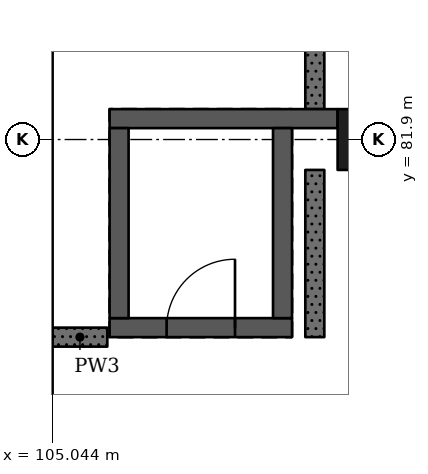
"""IFC4 building model, lengths in metres.
Left out: names, types, materials, properties, quantities, classifications, styles, units other than length and angle.
Written with IfcOpenShell. Run it as: python <this file> out.ifc"""

import sys

from ifc_helpers import new_model, si_unit, direction, frame, frame_2d, origin, origin_2d, place, context, subcontext, project, spatial, rectangle, extrude, element, fill, save


model = new_model("IFC4")
c1 = context("Model", 3, precision=1e-05, world=origin(), true_north=direction((0.0, 1.0)))
c2 = subcontext(c1, "Body", "Model", "MODEL_VIEW")
j1 = project(units=[si_unit("LENGTHUNIT", "METRE"), si_unit("PLANEANGLEUNIT", "RADIAN")], contexts=[c1])
p1 = place(None, origin())
s1 = spatial("IfcSite", under=j1, at=p1, CompositionType="ELEMENT")
p2 = place(p1, origin())
s2 = spatial("IfcBuilding", under=s1, at=p2, CompositionType="ELEMENT")
p3 = place(p2, frame((0.0, 0.0, 6.37)))
s3 = spatial("IfcBuildingStorey", under=s2, at=p3, CompositionType="ELEMENT", Elevation=6.37)
p4 = place(p3, frame((109.2, 81.9, 0.0), z_axis=(0.0, 0.0, 1.0), x_axis=(1.0, 0.0, 0.0)))
e1 = element("IfcColumn", 1, at=p4, inside=s3, PredefinedType="COLUMN", context=c2, shape_type="SweptSolid", body=[
    extrude(rectangle(XDim=0.8, YDim=0.8, at=origin_2d()), origin(), (0.0, 0.0, 1.0), 4.55),
])
p5 = place(p3, frame((108.2, 79.425, 0.0), z_axis=(0.0, 0.0, 1.0), x_axis=(-1.0, 0.0, 0.0)))
e2 = element("IfcWall", 2, at=p5, inside=s3, PredefinedType="SHEAR", context=c2, shape_type="SweptSolid", body=[
    extrude(rectangle(XDim=2.4, YDim=0.25, at=frame_2d((1.2, 0.0))), origin(), (0.0, 0.0, 1.0), 4.55),
])
p6 = place(p5, frame((0.75, 0.0, 0.0)))
e3 = element("IfcOpeningElement", 3, at=p6, cuts=e2, PredefinedType="OPENING", context=c2, shape_type="SweptSolid", body=[
    extrude(rectangle(XDim=0.9, YDim=2.1, at=frame_2d((0.45, 1.05))), frame((0.0, 0.135, 0.0), z_axis=(0.0, -1.0, 0.0), x_axis=(1.0, 0.0, 0.0)), (0.0, 0.0, 1.0), 0.27),
])
p7 = place(p3, frame((108.8, 82.175, 0.0), z_axis=(0.0, 0.0, 1.0), x_axis=(-1.0, 0.0, 0.0)))
e4 = element("IfcWall", 4, at=p7, inside=s3, PredefinedType="SHEAR", context=c2, shape_type="SweptSolid", body=[
    extrude(rectangle(XDim=3.0, YDim=0.25, at=frame_2d((1.5, 0.0))), origin(), (0.0, 0.0, 1.0), 4.55),
])
for number, where, z_axis, x_axis in (
    (5, (105.925, 82.05, 0.0), (0.0, 0.0, 1.0), (0.0, -1.0, 0.0)),
    (6, (108.075, 82.05, 0.0), (0.0, 0.0, 1.0), (0.0, -1.0, 0.0)),
):
    element("IfcWall", number, at=place(p3, frame(where, z_axis=z_axis, x_axis=x_axis)), inside=s3, PredefinedType="SHEAR", context=c2, shape_type="SweptSolid", body=[
        extrude(rectangle(XDim=2.5, YDim=0.25, at=frame_2d((1.25, 0.0))), origin(), (0.0, 0.0, 1.0), 4.55),
    ])
p8 = place(p3, frame((105.77, 79.3, 0.0), z_axis=(0.0, 0.0, 1.0), x_axis=(-1.0, 0.0, 0.0)))
e7 = element("IfcWall", 7, at=p8, inside=s3, PredefinedType="SOLIDWALL", context=c2, shape_type="SweptSolid", body=[
    extrude(rectangle(XDim=0.72, YDim=0.25, at=frame_2d((0.36, 0.0))), origin(), (0.0, 0.0, 1.0), 4.25),
])
p9 = place(p3, frame((108.5, 79.3, 0.0), z_axis=(0.0, 0.0, 1.0), x_axis=(0.0, 1.0, 0.0)))
e8 = element("IfcWall", 8, at=p9, inside=s3, PredefinedType="SOLIDWALL", context=c2, shape_type="SweptSolid", body=[
    extrude(rectangle(XDim=2.2, YDim=0.25, at=frame_2d((1.1, 0.0))), origin(), (0.0, 0.0, 1.0), 4.25),
])
p10 = place(p3, frame((108.5, 82.3, 0.0), z_axis=(0.0, 0.0, 1.0), x_axis=(0.0, 1.0, 0.0)))
e9 = element("IfcWall", 9, at=p10, inside=s3, PredefinedType="SOLIDWALL", context=c2, shape_type="SweptSolid", body=[
    extrude(rectangle(XDim=6.975, YDim=0.25, at=frame_2d((3.487, 0.0))), origin(), (0.0, 0.0, 1.0), 4.25),
])
p11 = place(p6, origin())
e10 = element("IfcDoor", 10, at=p11, inside=s3, OperationType="SINGLE_SWING_LEFT", PredefinedType="DOOR", context=c2, shape_type="SweptSolid", body=[
    extrude(rectangle(XDim=0.9, YDim=2.1, at=frame_2d((0.45, 1.05))), frame((0.0, 0.025, 0.0), z_axis=(0.0, -1.0, 0.0), x_axis=(1.0, 0.0, 0.0)), (0.0, 0.0, 1.0), 0.05),
])
fill(e3, e10)
save(model, sys.argv[1])
